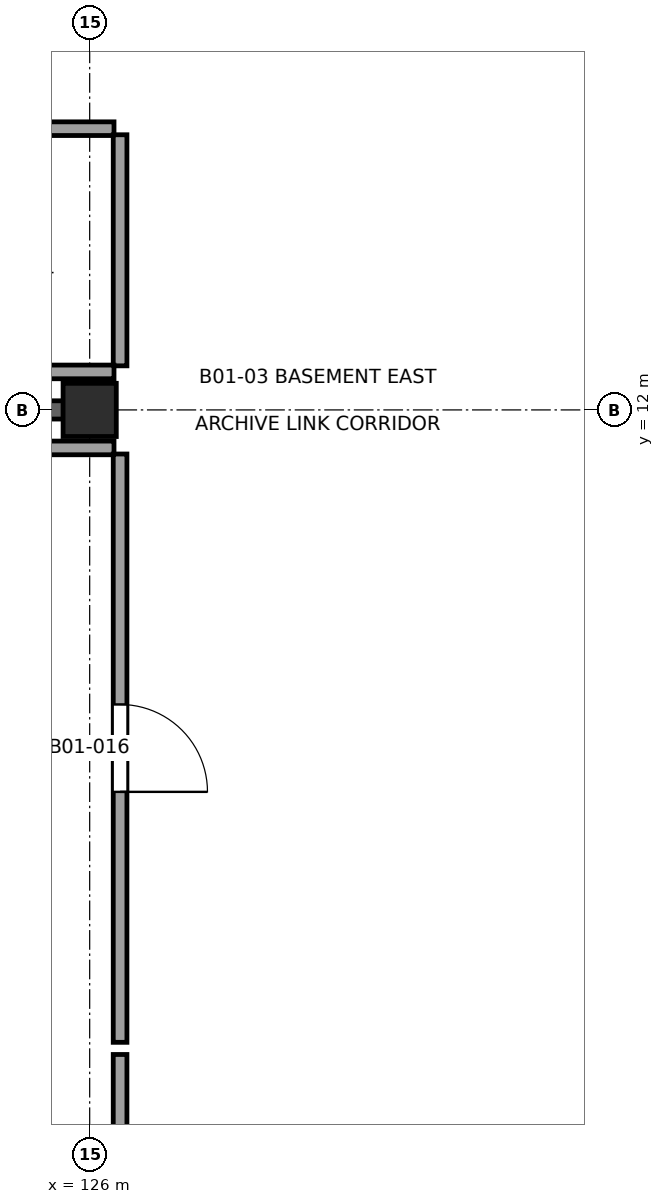
"""IFC4 building model, lengths in metres.
Left out: names, types, materials, properties, quantities, classifications, styles, units other than length and angle.
Written with IfcOpenShell. Run it as: python <this file> out.ifc"""

import sys

from ifc_helpers import new_model, si_unit, direction, frame, frame_2d, origin, origin_2d, place, context, subcontext, project, spatial, rectangle, extrude, element, fill, save


model = new_model("IFC4")
c1 = context("Model", 3, precision=1e-05, world=origin(), true_north=direction((0.0, 1.0)))
c2 = subcontext(c1, "Body", "Model", "MODEL_VIEW")
j1 = project(units=[si_unit("LENGTHUNIT", "METRE"), si_unit("PLANEANGLEUNIT", "RADIAN")], contexts=[c1])
p1 = place(None, origin())
s1 = spatial("IfcSite", under=j1, at=p1, CompositionType="ELEMENT")
p2 = place(p1, origin())
s2 = spatial("IfcBuilding", under=s1, at=p2, CompositionType="ELEMENT")
p3 = place(p2, frame((0.0, 0.0, -4.5)))
s3 = spatial("IfcBuildingStorey", under=s2, at=p3, CompositionType="ELEMENT", Elevation=-4.5)
p4 = place(p3, frame((126.0, 12.0, 0.0), z_axis=(0.0, 0.0, 1.0), x_axis=(1.0, 0.0, 0.0)))
e1 = element("IfcColumn", 1, at=p4, inside=s3, PredefinedType="COLUMN", context=c2, shape_type="SweptSolid", body=[
    extrude(rectangle(XDim=0.7, YDim=0.7, at=origin_2d()), origin(), (0.0, 0.0, 1.0), 4.5),
])
p5 = place(p3, frame((117.346, 12.0, 0.0), z_axis=(0.0, 0.0, 1.0), x_axis=(1.0, 0.0, 0.0)))
e2 = element("IfcWall", 2, at=p5, inside=s3, PredefinedType="SHEAR", context=c2, shape_type="SweptSolid", body=[
    extrude(rectangle(XDim=8.308, YDim=0.24, at=frame_2d((4.154, 0.0))), origin(), (0.0, 0.0, 1.0), 3.685),
])
p6 = place(p3, frame((126.4, 3.52, 0.0), z_axis=(0.0, 0.0, 1.0), x_axis=(0.0, -1.0, 0.0)))
e3 = element("IfcWall", 3, at=p6, inside=s3, PredefinedType="PARTITIONING", context=c2, shape_type="SweptSolid", body=[
    extrude(rectangle(XDim=3.174, YDim=0.18, at=frame_2d((1.587, 0.0))), origin(), (0.0, 0.0, 1.0), 4.14),
])
p7 = place(p3, frame((116.795, 11.5, 0.0), z_axis=(0.0, 0.0, 1.0), x_axis=(1.0, 0.0, 0.0)))
e4 = element("IfcWall", 4, at=p7, inside=s3, PredefinedType="PARTITIONING", context=c2, shape_type="SweptSolid", body=[
    extrude(rectangle(XDim=9.525, YDim=0.18, at=frame_2d((4.763, 0.0))), origin(), (0.0, 0.0, 1.0), 4.14),
])
p8 = place(p3, frame((126.4, 11.42, 0.0), z_axis=(0.0, 0.0, 1.0), x_axis=(0.0, -1.0, 0.0)))
e5 = element("IfcWall", 5, at=p8, inside=s3, PredefinedType="PARTITIONING", context=c2, shape_type="SweptSolid", body=[
    extrude(rectangle(XDim=7.74, YDim=0.18, at=frame_2d((3.87, 0.0))), origin(), (0.0, 0.0, 1.0), 4.14),
])
p9 = place(p8, frame((3.295, 0.0, 0.0)))
e6 = element("IfcOpeningElement", 6, at=p9, cuts=e5, PredefinedType="OPENING", context=c2, shape_type="SweptSolid", body=[
    extrude(rectangle(XDim=1.15, YDim=2.15, at=frame_2d((0.575, 1.075))), frame((0.0, 0.105, 0.0), z_axis=(0.0, -1.0, 0.0), x_axis=(1.0, 0.0, 0.0)), (0.0, 0.0, 1.0), 0.21),
])
p10 = place(p3, frame((116.795, 15.7, 0.0), z_axis=(0.0, 0.0, 1.0), x_axis=(1.0, 0.0, 0.0)))
e7 = element("IfcWall", 7, at=p10, inside=s3, PredefinedType="PARTITIONING", context=c2, shape_type="SweptSolid", body=[
    extrude(rectangle(XDim=9.525, YDim=0.18, at=frame_2d((4.763, 0.0))), origin(), (0.0, 0.0, 1.0), 4.14),
])
p11 = place(p10, frame((4.288, 0.0, 0.0)))
e8 = element("IfcOpeningElement", 8, at=p11, cuts=e7, PredefinedType="OPENING", context=c2, shape_type="SweptSolid", body=[
    extrude(rectangle(XDim=0.95, YDim=2.1, at=frame_2d((0.475, 1.05))), frame((0.0, 0.105, 0.0), z_axis=(0.0, -1.0, 0.0), x_axis=(1.0, 0.0, 0.0)), (0.0, 0.0, 1.0), 0.21),
])
p12 = place(p10, frame((7.175, 0.0, 1.05)))
e9 = element("IfcOpeningElement", 9, at=p12, cuts=e7, PredefinedType="OPENING", context=c2, shape_type="SweptSolid", body=[
    extrude(rectangle(XDim=1.5, YDim=1.1, at=frame_2d((0.75, 0.55))), frame((0.0, 0.105, 0.0), z_axis=(0.0, -1.0, 0.0), x_axis=(1.0, 0.0, 0.0)), (0.0, 0.0, 1.0), 0.21),
])
p13 = place(p3, frame((126.4, 15.62, 0.0), z_axis=(0.0, 0.0, 1.0), x_axis=(0.0, -1.0, 0.0)))
e10 = element("IfcWall", 10, at=p13, inside=s3, PredefinedType="PARTITIONING", context=c2, shape_type="SweptSolid", body=[
    extrude(rectangle(XDim=3.04, YDim=0.18, at=frame_2d((1.52, 0.0))), origin(), (0.0, 0.0, 1.0), 4.14),
])
p14 = place(p3, frame((126.32, 12.5, 0.0), z_axis=(0.0, 0.0, 1.0), x_axis=(-1.0, 0.0, 0.0)))
e11 = element("IfcWall", 11, at=p14, inside=s3, PredefinedType="PARTITIONING", context=c2, shape_type="SweptSolid", body=[
    extrude(rectangle(XDim=9.525, YDim=0.18, at=frame_2d((4.763, 0.0))), origin(), (0.0, 0.0, 1.0), 4.14),
])
p15 = place(p9, origin())
e12 = element("IfcDoor", 12, at=p15, inside=s3, OperationType="SINGLE_SWING_RIGHT", PredefinedType="DOOR", context=c2, shape_type="SweptSolid", body=[
    extrude(rectangle(XDim=1.15, YDim=2.15, at=frame_2d((0.575, 1.075))), frame((0.0, 0.025, 0.0), z_axis=(0.0, -1.0, 0.0), x_axis=(1.0, 0.0, 0.0)), (0.0, 0.0, 1.0), 0.05),
])
fill(e6, e12)
save(model, sys.argv[1])
